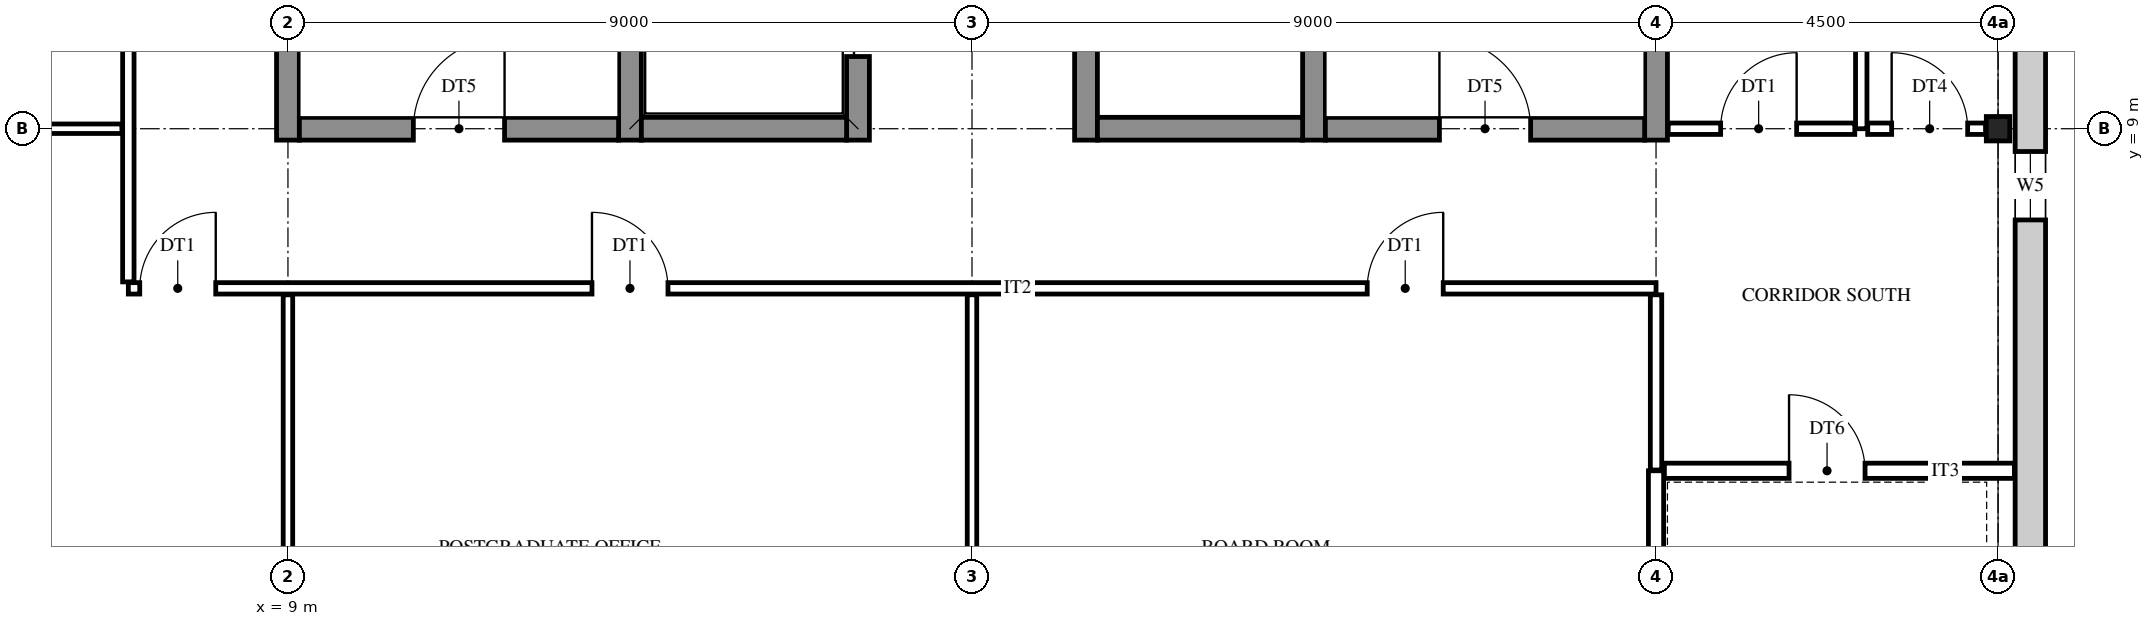
"""IFC4 building model, lengths in metres.
Left out: names, types, materials, properties, quantities, classifications, styles, units other than length and angle.
Written with IfcOpenShell. Run it as: python <this file> out.ifc"""

import sys

from ifc_helpers import new_model, si_unit, direction, frame, frame_2d, origin, origin_2d, place, context, subcontext, project, spatial, rectangle, i_section, extrude, element, fill, save


model = new_model("IFC4")
c1 = context("Model", 3, precision=1e-05, world=origin(), true_north=direction((0.0, 1.0)))
c2 = subcontext(c1, "Body", "Model", "MODEL_VIEW")
j1 = project(units=[si_unit("LENGTHUNIT", "METRE"), si_unit("PLANEANGLEUNIT", "RADIAN")], contexts=[c1])
p1 = place(None, origin())
s1 = spatial("IfcSite", under=j1, at=p1, CompositionType="ELEMENT")
p2 = place(p1, origin())
s2 = spatial("IfcBuilding", under=s1, at=p2, CompositionType="ELEMENT")
p3 = place(p2, frame((0.0, 0.0, 57.0)))
s3 = spatial("IfcBuildingStorey", under=s2, at=p3, CompositionType="ELEMENT", Elevation=57.0)
p4 = place(p3, frame((31.5, 9.0, 0.0), z_axis=(0.0, 0.0, 1.0), x_axis=(1.0, 0.0, 0.0)))
e1 = element("IfcColumn", 1, at=p4, inside=s3, PredefinedType="COLUMN", context=c2, shape_type="SweptSolid", body=[
    extrude(i_section(OverallWidth=0.309, OverallDepth=0.321, WebThickness=0.014, FlangeThickness=0.022, FilletRadius=0.017, at=origin_2d()), origin(), (0.0, 0.0, 1.0), 4.2),
])
for number, where, z_axis, x_axis in (
    (2, (9.0, 8.85, 0.0), (0.0, 0.0, 1.0), (0.0, 1.0, 0.0)),
    (3, (13.5, 8.85, 0.0), (0.0, 0.0, 1.0), (0.0, 1.0, 0.0)),
):
    element("IfcWall", number, at=place(p3, frame(where, z_axis=z_axis, x_axis=x_axis)), inside=s3, PredefinedType="SHEAR", context=c2, shape_type="SweptSolid", body=[
        extrude(rectangle(XDim=9.3, YDim=0.3, at=frame_2d((4.65, 0.0))), origin(), (0.0, 0.0, 1.0), 4.2),
    ])
p5 = place(p3, frame((16.5, 8.85, 0.0), z_axis=(0.0, 0.0, 1.0), x_axis=(0.0, 1.0, 0.0)))
e4 = element("IfcWall", 4, at=p5, inside=s3, PredefinedType="SHEAR", context=c2, shape_type="SweptSolid", body=[
    extrude(rectangle(XDim=9.3, YDim=0.3, at=frame_2d((4.65, 0.0))), origin(), (0.0, 0.0, 1.0), 4.2),
])
p6 = place(p5, frame((1.1, 0.0, 0.0)))
e5 = element("IfcOpeningElement", 5, at=p6, cuts=e4, PredefinedType="OPENING", context=c2, shape_type="SweptSolid", body=[
    extrude(rectangle(XDim=1.1, YDim=2.1, at=frame_2d((0.55, 1.05))), frame((0.0, 0.16, 0.0), z_axis=(0.0, -1.0, 0.0), x_axis=(1.0, 0.0, 0.0)), (0.0, 0.0, 1.0), 0.32),
])
p7 = place(p5, frame((4.1, 0.0, 0.0)))
e6 = element("IfcOpeningElement", 6, at=p7, cuts=e4, PredefinedType="OPENING", context=c2, shape_type="SweptSolid", body=[
    extrude(rectangle(XDim=1.1, YDim=2.1, at=frame_2d((0.55, 1.05))), frame((0.0, 0.16, 0.0), z_axis=(0.0, -1.0, 0.0), x_axis=(1.0, 0.0, 0.0)), (0.0, 0.0, 1.0), 0.32),
])
p8 = place(p3, frame((19.5, 8.85, 0.0), z_axis=(0.0, 0.0, 1.0), x_axis=(0.0, 1.0, 0.0)))
e7 = element("IfcWall", 7, at=p8, inside=s3, PredefinedType="SHEAR", context=c2, shape_type="SweptSolid", body=[
    extrude(rectangle(XDim=9.3, YDim=0.3, at=frame_2d((4.65, 0.0))), origin(), (0.0, 0.0, 1.0), 4.2),
])
p9 = place(p8, frame((3.95, 0.0, 0.0)))
e8 = element("IfcOpeningElement", 8, at=p9, cuts=e7, PredefinedType="OPENING", context=c2, shape_type="SweptSolid", body=[
    extrude(rectangle(XDim=1.4, YDim=2.1, at=frame_2d((0.7, 1.05))), frame((0.0, 0.16, 0.0), z_axis=(0.0, -1.0, 0.0), x_axis=(1.0, 0.0, 0.0)), (0.0, 0.0, 1.0), 0.32),
])
p10 = place(p8, frame((7.1, 0.0, 0.0)))
e9 = element("IfcOpeningElement", 9, at=p10, cuts=e7, PredefinedType="OPENING", context=c2, shape_type="SweptSolid", body=[
    extrude(rectangle(XDim=1.1, YDim=2.1, at=frame_2d((0.55, 1.05))), frame((0.0, 0.16, 0.0), z_axis=(0.0, -1.0, 0.0), x_axis=(1.0, 0.0, 0.0)), (0.0, 0.0, 1.0), 0.32),
])
for number, where, z_axis, x_axis in (
    (10, (22.5, 8.85, 0.0), (0.0, 0.0, 1.0), (0.0, 1.0, 0.0)),
    (11, (27.0, 8.85, 0.0), (0.0, 0.0, 1.0), (0.0, 1.0, 0.0)),
):
    element("IfcWall", number, at=place(p3, frame(where, z_axis=z_axis, x_axis=x_axis)), inside=s3, PredefinedType="SHEAR", context=c2, shape_type="SweptSolid", body=[
        extrude(rectangle(XDim=9.3, YDim=0.3, at=frame_2d((4.65, 0.0))), origin(), (0.0, 0.0, 1.0), 4.2),
    ])
p11 = place(p3, frame((9.15, 9.0, 0.0), z_axis=(0.0, 0.0, 1.0), x_axis=(1.0, 0.0, 0.0)))
e12 = element("IfcWall", 12, at=p11, inside=s3, PredefinedType="SHEAR", context=c2, shape_type="SweptSolid", body=[
    extrude(rectangle(XDim=4.2, YDim=0.3, at=frame_2d((2.1, 0.0))), origin(), (0.0, 0.0, 1.0), 4.2),
])
p12 = place(p11, frame((1.5, 0.0, 0.0)))
e13 = element("IfcOpeningElement", 13, at=p12, cuts=e12, PredefinedType="OPENING", context=c2, shape_type="SweptSolid", body=[
    extrude(rectangle(XDim=1.2, YDim=2.1, at=frame_2d((0.6, 1.05))), frame((0.0, 0.16, 0.0), z_axis=(0.0, -1.0, 0.0), x_axis=(1.0, 0.0, 0.0)), (0.0, 0.0, 1.0), 0.32),
])
for number, where, z_axis, x_axis in (
    (14, (13.65, 9.0, 0.0), (0.0, 0.0, 1.0), (1.0, 0.0, 0.0)),
    (15, (19.65, 9.0, 0.0), (0.0, 0.0, 1.0), (1.0, 0.0, 0.0)),
):
    element("IfcWall", number, at=place(p3, frame(where, z_axis=z_axis, x_axis=x_axis)), inside=s3, PredefinedType="SHEAR", context=c2, shape_type="SweptSolid", body=[
        extrude(rectangle(XDim=2.7, YDim=0.3, at=frame_2d((1.35, 0.0))), origin(), (0.0, 0.0, 1.0), 4.2),
    ])
p13 = place(p3, frame((22.65, 9.0, 0.0), z_axis=(0.0, 0.0, 1.0), x_axis=(1.0, 0.0, 0.0)))
e16 = element("IfcWall", 16, at=p13, inside=s3, PredefinedType="SHEAR", context=c2, shape_type="SweptSolid", body=[
    extrude(rectangle(XDim=4.2, YDim=0.3, at=frame_2d((2.1, 0.0))), origin(), (0.0, 0.0, 1.0), 4.2),
])
p14 = place(p13, frame((1.5, 0.0, 0.0)))
e17 = element("IfcOpeningElement", 17, at=p14, cuts=e16, PredefinedType="OPENING", context=c2, shape_type="SweptSolid", body=[
    extrude(rectangle(XDim=1.2, YDim=2.1, at=frame_2d((0.6, 1.05))), frame((0.0, 0.16, 0.0), z_axis=(0.0, -1.0, 0.0), x_axis=(1.0, 0.0, 0.0)), (0.0, 0.0, 1.0), 0.32),
])
p15 = place(p3, frame((31.925, 27.225, 0.0), z_axis=(0.0, 0.0, 1.0), x_axis=(0.0, -1.0, 0.0)))
e18 = element("IfcWall", 18, at=p15, inside=s3, PredefinedType="STANDARD", context=c2, shape_type="SweptSolid", body=[
    extrude(rectangle(XDim=27.45, YDim=0.4, at=frame_2d((13.725, 0.0))), origin(), (0.0, 0.0, 1.0), 4.2),
])
p16 = place(p15, frame((26.025, 0.0, 0.9)))
e19 = element("IfcOpeningElement", 19, at=p16, cuts=e18, PredefinedType="OPENING", context=c2, shape_type="SweptSolid", body=[
    extrude(rectangle(XDim=0.9, YDim=2.0, at=frame_2d((0.45, 1.0))), frame((0.0, 0.21, 0.0), z_axis=(0.0, -1.0, 0.0), x_axis=(1.0, 0.0, 0.0)), (0.0, 0.0, 1.0), 0.42),
])
p17 = place(p15, frame((18.525, 0.0, 0.9)))
e20 = element("IfcOpeningElement", 20, at=p17, cuts=e18, PredefinedType="OPENING", context=c2, shape_type="SweptSolid", body=[
    extrude(rectangle(XDim=0.9, YDim=2.0, at=frame_2d((0.45, 1.0))), frame((0.0, 0.21, 0.0), z_axis=(0.0, -1.0, 0.0), x_axis=(1.0, 0.0, 0.0)), (0.0, 0.0, 1.0), 0.42),
])
p18 = place(p15, frame((15.675, 0.0, 1.6)))
e21 = element("IfcOpeningElement", 21, at=p18, cuts=e18, PredefinedType="OPENING", context=c2, shape_type="SweptSolid", body=[
    extrude(rectangle(XDim=0.6, YDim=0.9, at=frame_2d((0.3, 0.45))), frame((0.0, 0.21, 0.0), z_axis=(0.0, -1.0, 0.0), x_axis=(1.0, 0.0, 0.0)), (0.0, 0.0, 1.0), 0.42),
])
p19 = place(p15, frame((11.175, 0.0, 1.6)))
e22 = element("IfcOpeningElement", 22, at=p19, cuts=e18, PredefinedType="OPENING", context=c2, shape_type="SweptSolid", body=[
    extrude(rectangle(XDim=0.6, YDim=0.9, at=frame_2d((0.3, 0.45))), frame((0.0, 0.21, 0.0), z_axis=(0.0, -1.0, 0.0), x_axis=(1.0, 0.0, 0.0)), (0.0, 0.0, 1.0), 0.42),
])
p20 = place(p15, frame((8.025, 0.0, 0.9)))
e23 = element("IfcOpeningElement", 23, at=p20, cuts=e18, PredefinedType="OPENING", context=c2, shape_type="SweptSolid", body=[
    extrude(rectangle(XDim=0.9, YDim=2.0, at=frame_2d((0.45, 1.0))), frame((0.0, 0.21, 0.0), z_axis=(0.0, -1.0, 0.0), x_axis=(1.0, 0.0, 0.0)), (0.0, 0.0, 1.0), 0.42),
])
p21 = place(p15, frame((0.525, 0.0, 0.9)))
e24 = element("IfcOpeningElement", 24, at=p21, cuts=e18, PredefinedType="OPENING", context=c2, shape_type="SweptSolid", body=[
    extrude(rectangle(XDim=0.9, YDim=2.0, at=frame_2d((0.45, 1.0))), frame((0.0, 0.21, 0.0), z_axis=(0.0, -1.0, 0.0), x_axis=(1.0, 0.0, 0.0)), (0.0, 0.0, 1.0), 0.42),
])
p22 = place(p3, frame((6.9, 6.985, 0.0), z_axis=(0.0, 0.0, 1.0), x_axis=(0.0, 1.0, 0.0)))
e25 = element("IfcWall", 25, at=p22, inside=s3, PredefinedType="PARTITIONING", context=c2, shape_type="SweptSolid", body=[
    extrude(rectangle(XDim=13.03, YDim=0.15, at=frame_2d((6.515, 0.0))), origin(), (0.0, 0.0, 1.0), 3.542),
])
p23 = place(p22, frame((11.565, 0.0, 0.0)))
e26 = element("IfcOpeningElement", 26, at=p23, cuts=e25, PredefinedType="OPENING", context=c2, shape_type="SweptSolid", body=[
    extrude(rectangle(XDim=1.0, YDim=2.1, at=frame_2d((0.5, 1.05))), frame((0.0, 0.085, 0.0), z_axis=(0.0, -1.0, 0.0), x_axis=(1.0, 0.0, 0.0)), (0.0, 0.0, 1.0), 0.17),
])
p24 = place(p22, frame((3.765, 0.0, 0.0)))
e27 = element("IfcOpeningElement", 27, at=p24, cuts=e25, PredefinedType="OPENING", context=c2, shape_type="SweptSolid", body=[
    extrude(rectangle(XDim=1.0, YDim=2.1, at=frame_2d((0.5, 1.05))), frame((0.0, 0.085, 0.0), z_axis=(0.0, -1.0, 0.0), x_axis=(1.0, 0.0, 0.0)), (0.0, 0.0, 1.0), 0.17),
])
p25 = place(p22, frame((8.265, 0.0, 0.0)))
e28 = element("IfcOpeningElement", 28, at=p25, cuts=e25, PredefinedType="OPENING", context=c2, shape_type="SweptSolid", body=[
    extrude(rectangle(XDim=1.0, YDim=2.1, at=frame_2d((0.5, 1.05))), frame((0.0, 0.085, 0.0), z_axis=(0.0, -1.0, 0.0), x_axis=(1.0, 0.0, 0.0)), (0.0, 0.0, 1.0), 0.17),
])
for number, where, z_axis, x_axis in (
    (29, (9.0, 0.17, 0.0), (0.0, 0.0, 1.0), (0.0, 1.0, 0.0)),
    (30, (18.0, 0.17, 0.0), (0.0, 0.0, 1.0), (0.0, 1.0, 0.0)),
):
    element("IfcWall", number, at=place(p3, frame(where, z_axis=z_axis, x_axis=x_axis)), inside=s3, PredefinedType="PARTITIONING", context=c2, shape_type="SweptSolid", body=[
        extrude(rectangle(XDim=6.645, YDim=0.125, at=frame_2d((3.322, 0.0))), origin(), (0.0, 0.0, 1.0), 3.542),
    ])
p26 = place(p3, frame((27.0, 0.17, 0.0), z_axis=(0.0, 0.0, 1.0), x_axis=(0.0, 1.0, 0.0)))
e31 = element("IfcWall", 31, at=p26, inside=s3, PredefinedType="PARTITIONING", context=c2, shape_type="SweptSolid", body=[
    extrude(rectangle(XDim=4.33, YDim=0.2, at=frame_2d((2.165, 0.0))), origin(), (0.0, 0.0, 1.0), 3.542),
])
p27 = place(p3, frame((27.0, 4.51, 0.0), z_axis=(0.0, 0.0, 1.0), x_axis=(0.0, 1.0, 0.0)))
e32 = element("IfcWall", 32, at=p27, inside=s3, PredefinedType="PARTITIONING", context=c2, shape_type="SweptSolid", body=[
    extrude(rectangle(XDim=2.305, YDim=0.15, at=frame_2d((1.152, 0.0))), origin(), (0.0, 0.0, 1.0), 3.542),
])
p28 = place(p3, frame((29.7, 9.0, 0.0), z_axis=(0.0, 0.0, 1.0), x_axis=(0.0, 1.0, 0.0)))
e33 = element("IfcWall", 33, at=p28, inside=s3, PredefinedType="PARTITIONING", context=c2, shape_type="SweptSolid", body=[
    extrude(rectangle(XDim=6.3, YDim=0.15, at=frame_2d((3.15, 0.0))), origin(), (0.0, 0.0, 1.0), 3.542),
])
p29 = place(p28, frame((4.0, 0.0, 0.0)))
e34 = element("IfcOpeningElement", 34, at=p29, cuts=e33, PredefinedType="OPENING", context=c2, shape_type="SweptSolid", body=[
    extrude(rectangle(XDim=1.0, YDim=2.1, at=frame_2d((0.5, 1.05))), frame((0.0, 0.085, 0.0), z_axis=(0.0, -1.0, 0.0), x_axis=(1.0, 0.0, 0.0)), (0.0, 0.0, 1.0), 0.17),
])
p30 = place(p3, frame((27.11, 4.5, 0.0), z_axis=(0.0, 0.0, 1.0), x_axis=(1.0, 0.0, 0.0)))
e35 = element("IfcWall", 35, at=p30, inside=s3, PredefinedType="PARTITIONING", context=c2, shape_type="SweptSolid", body=[
    extrude(rectangle(XDim=4.605, YDim=0.2, at=frame_2d((2.302, 0.0))), origin(), (0.0, 0.0, 1.0), 3.542),
])
p31 = place(p30, frame((1.64, 0.0, 0.0)))
e36 = element("IfcOpeningElement", 36, at=p31, cuts=e35, PredefinedType="OPENING", context=c2, shape_type="SweptSolid", body=[
    extrude(rectangle(XDim=1.0, YDim=2.1, at=frame_2d((0.5, 1.05))), frame((0.0, 0.11, 0.0), z_axis=(0.0, -1.0, 0.0), x_axis=(1.0, 0.0, 0.0)), (0.0, 0.0, 1.0), 0.22),
])
p32 = place(p3, frame((6.9, 6.9, 0.0), z_axis=(0.0, 0.0, 1.0), x_axis=(1.0, 0.0, 0.0)))
e37 = element("IfcWall", 37, at=p32, inside=s3, PredefinedType="PARTITIONING", context=c2, shape_type="SweptSolid", body=[
    extrude(rectangle(XDim=20.1, YDim=0.15, at=frame_2d((10.05, 0.0))), origin(), (0.0, 0.0, 1.0), 3.542),
])
p33 = place(p32, frame((0.15, 0.0, 0.0)))
e38 = element("IfcOpeningElement", 38, at=p33, cuts=e37, PredefinedType="OPENING", context=c2, shape_type="SweptSolid", body=[
    extrude(rectangle(XDim=1.0, YDim=2.1, at=frame_2d((0.5, 1.05))), frame((0.0, 0.085, 0.0), z_axis=(0.0, -1.0, 0.0), x_axis=(1.0, 0.0, 0.0)), (0.0, 0.0, 1.0), 0.17),
])
p34 = place(p32, frame((6.1, 0.0, 0.0)))
e39 = element("IfcOpeningElement", 39, at=p34, cuts=e37, PredefinedType="OPENING", context=c2, shape_type="SweptSolid", body=[
    extrude(rectangle(XDim=1.0, YDim=2.1, at=frame_2d((0.5, 1.05))), frame((0.0, 0.085, 0.0), z_axis=(0.0, -1.0, 0.0), x_axis=(1.0, 0.0, 0.0)), (0.0, 0.0, 1.0), 0.17),
])
p35 = place(p32, frame((16.3, 0.0, 0.0)))
e40 = element("IfcOpeningElement", 40, at=p35, cuts=e37, PredefinedType="OPENING", context=c2, shape_type="SweptSolid", body=[
    extrude(rectangle(XDim=1.0, YDim=2.1, at=frame_2d((0.5, 1.05))), frame((0.0, 0.085, 0.0), z_axis=(0.0, -1.0, 0.0), x_axis=(1.0, 0.0, 0.0)), (0.0, 0.0, 1.0), 0.17),
])
p36 = place(p3, frame((0.165, 9.0, 0.0), z_axis=(0.0, 0.0, 1.0), x_axis=(1.0, 0.0, 0.0)))
e41 = element("IfcWall", 41, at=p36, inside=s3, PredefinedType="PARTITIONING", context=c2, shape_type="SweptSolid", body=[
    extrude(rectangle(XDim=6.65, YDim=0.125, at=frame_2d((3.325, 0.0))), origin(), (0.0, 0.0, 1.0), 3.542),
])
p37 = place(p3, frame((27.16, 9.0, 0.0), z_axis=(0.0, 0.0, 1.0), x_axis=(1.0, 0.0, 0.0)))
e42 = element("IfcWall", 42, at=p37, inside=s3, PredefinedType="PARTITIONING", context=c2, shape_type="SweptSolid", body=[
    extrude(rectangle(XDim=2.455, YDim=0.15, at=frame_2d((1.228, 0.0))), origin(), (0.0, 0.0, 1.0), 3.542),
])
p38 = place(p37, frame((0.69, 0.0, 0.0)))
e43 = element("IfcOpeningElement", 43, at=p38, cuts=e42, PredefinedType="OPENING", context=c2, shape_type="SweptSolid", body=[
    extrude(rectangle(XDim=1.0, YDim=2.1, at=frame_2d((0.5, 1.05))), frame((0.0, 0.085, 0.0), z_axis=(0.0, -1.0, 0.0), x_axis=(1.0, 0.0, 0.0)), (0.0, 0.0, 1.0), 0.17),
])
p39 = place(p3, frame((29.785, 9.0, 0.0), z_axis=(0.0, 0.0, 1.0), x_axis=(1.0, 0.0, 0.0)))
e44 = element("IfcWall", 44, at=p39, inside=s3, PredefinedType="PARTITIONING", context=c2, shape_type="SweptSolid", body=[
    extrude(rectangle(XDim=1.551, YDim=0.15, at=frame_2d((0.775, 0.0))), origin(), (0.0, 0.0, 1.0), 3.542),
])
p40 = place(p39, frame((0.315, 0.0, 0.0)))
e45 = element("IfcOpeningElement", 45, at=p40, cuts=e44, PredefinedType="OPENING", context=c2, shape_type="SweptSolid", body=[
    extrude(rectangle(XDim=1.0, YDim=2.1, at=frame_2d((0.5, 1.05))), frame((0.0, 0.085, 0.0), z_axis=(0.0, -1.0, 0.0), x_axis=(1.0, 0.0, 0.0)), (0.0, 0.0, 1.0), 0.17),
])
p41 = place(p17, origin())
e46 = element("IfcWindow", 46, at=p41, inside=s3, PartitioningType="SINGLE_PANEL", PredefinedType="WINDOW", context=c2, shape_type="SweptSolid", body=[
    extrude(rectangle(XDim=0.9, YDim=2.0, at=frame_2d((0.45, 1.0))), frame((0.0, 0.03, 0.0), z_axis=(0.0, -1.0, 0.0), x_axis=(1.0, 0.0, 0.0)), (0.0, 0.0, 1.0), 0.06),
])
fill(e20, e46)
p42 = place(p12, origin())
e47 = element("IfcDoor", 47, at=p42, inside=s3, OperationType="SINGLE_SWING_RIGHT", PredefinedType="DOOR", context=c2, shape_type="SweptSolid", body=[
    extrude(rectangle(XDim=1.2, YDim=2.1, at=frame_2d((0.6, 1.05))), frame((0.0, 0.025, 0.0), z_axis=(0.0, -1.0, 0.0), x_axis=(1.0, 0.0, 0.0)), (0.0, 0.0, 1.0), 0.05),
])
fill(e13, e47)
p43 = place(p14, origin())
e48 = element("IfcDoor", 48, at=p43, inside=s3, OperationType="SINGLE_SWING_LEFT", PredefinedType="DOOR", context=c2, shape_type="SweptSolid", body=[
    extrude(rectangle(XDim=1.2, YDim=2.1, at=frame_2d((0.6, 1.05))), frame((0.0, 0.025, 0.0), z_axis=(0.0, -1.0, 0.0), x_axis=(1.0, 0.0, 0.0)), (0.0, 0.0, 1.0), 0.05),
])
fill(e17, e48)
p44 = place(p38, origin())
e49 = element("IfcDoor", 49, at=p44, inside=s3, OperationType="SINGLE_SWING_RIGHT", PredefinedType="DOOR", context=c2, shape_type="SweptSolid", body=[
    extrude(rectangle(XDim=1.0, YDim=2.1, at=frame_2d((0.5, 1.05))), frame((0.0, 0.025, 0.0), z_axis=(0.0, -1.0, 0.0), x_axis=(1.0, 0.0, 0.0)), (0.0, 0.0, 1.0), 0.05),
])
fill(e43, e49)
p45 = place(p40, origin())
e50 = element("IfcDoor", 50, at=p45, inside=s3, OperationType="SINGLE_SWING_LEFT", PredefinedType="DOOR", context=c2, shape_type="SweptSolid", body=[
    extrude(rectangle(XDim=1.0, YDim=2.1, at=frame_2d((0.5, 1.05))), frame((0.0, 0.025, 0.0), z_axis=(0.0, -1.0, 0.0), x_axis=(1.0, 0.0, 0.0)), (0.0, 0.0, 1.0), 0.05),
])
fill(e45, e50)
p46 = place(p31, frame((1.0, 0.0, 0.0), z_axis=(0.0, 0.0, 1.0), x_axis=(-1.0, 0.0, 0.0)))
e51 = element("IfcDoor", 51, at=p46, inside=s3, OperationType="SINGLE_SWING_LEFT", PredefinedType="DOOR", context=c2, shape_type="SweptSolid", body=[
    extrude(rectangle(XDim=1.0, YDim=2.1, at=frame_2d((0.5, 1.05))), frame((0.0, 0.025, 0.0), z_axis=(0.0, -1.0, 0.0), x_axis=(1.0, 0.0, 0.0)), (0.0, 0.0, 1.0), 0.05),
])
fill(e36, e51)
p47 = place(p33, frame((1.0, 0.0, 0.0), z_axis=(0.0, 0.0, 1.0), x_axis=(-1.0, 0.0, 0.0)))
e52 = element("IfcDoor", 52, at=p47, inside=s3, OperationType="SINGLE_SWING_RIGHT", PredefinedType="DOOR", context=c2, shape_type="SweptSolid", body=[
    extrude(rectangle(XDim=1.0, YDim=2.1, at=frame_2d((0.5, 1.05))), frame((0.0, 0.025, 0.0), z_axis=(0.0, -1.0, 0.0), x_axis=(1.0, 0.0, 0.0)), (0.0, 0.0, 1.0), 0.05),
])
fill(e38, e52)
p48 = place(p34, frame((1.0, 0.0, 0.0), z_axis=(0.0, 0.0, 1.0), x_axis=(-1.0, 0.0, 0.0)))
e53 = element("IfcDoor", 53, at=p48, inside=s3, OperationType="SINGLE_SWING_LEFT", PredefinedType="DOOR", context=c2, shape_type="SweptSolid", body=[
    extrude(rectangle(XDim=1.0, YDim=2.1, at=frame_2d((0.5, 1.05))), frame((0.0, 0.025, 0.0), z_axis=(0.0, -1.0, 0.0), x_axis=(1.0, 0.0, 0.0)), (0.0, 0.0, 1.0), 0.05),
])
fill(e39, e53)
p49 = place(p35, frame((1.0, 0.0, 0.0), z_axis=(0.0, 0.0, 1.0), x_axis=(-1.0, 0.0, 0.0)))
e54 = element("IfcDoor", 54, at=p49, inside=s3, OperationType="SINGLE_SWING_RIGHT", PredefinedType="DOOR", context=c2, shape_type="SweptSolid", body=[
    extrude(rectangle(XDim=1.0, YDim=2.1, at=frame_2d((0.5, 1.05))), frame((0.0, 0.025, 0.0), z_axis=(0.0, -1.0, 0.0), x_axis=(1.0, 0.0, 0.0)), (0.0, 0.0, 1.0), 0.05),
])
fill(e40, e54)
p50 = place(p6, origin())
e55 = element("IfcDoor", 55, at=p50, inside=s3, OperationType="DOUBLE_DOOR_SLIDING", PredefinedType="DOOR", context=c2, shape_type="SweptSolid", body=[
    extrude(rectangle(XDim=1.1, YDim=2.1, at=frame_2d((0.55, 1.05))), frame((0.0, 0.025, 0.0), z_axis=(0.0, -1.0, 0.0), x_axis=(1.0, 0.0, 0.0)), (0.0, 0.0, 1.0), 0.05),
])
fill(e5, e55)
save(model, sys.argv[1])
